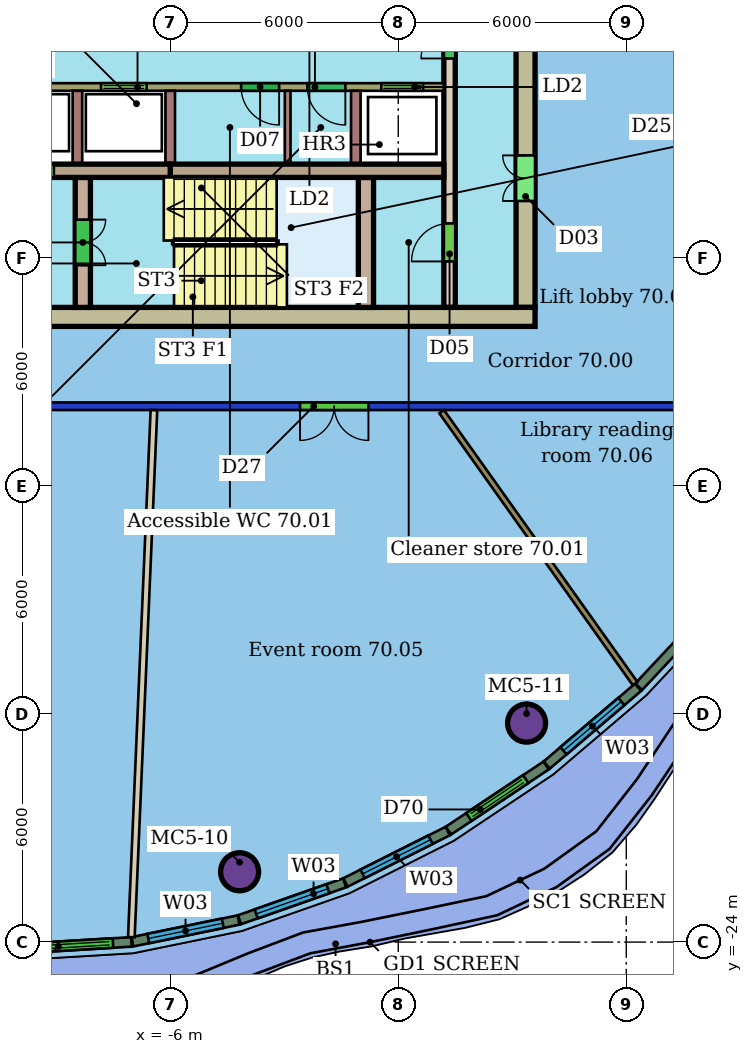
"""IFC4 building model, lengths in metres.
Left out: names, types, materials, properties, quantities, classifications, styles, units other than length and angle.
Written with IfcOpenShell. Run it as: python <this file> out.ifc"""

import sys

from ifc_helpers import new_model, si_unit, direction, frame, frame_2d, origin, origin_2d, place, context, subcontext, project, spatial, rectangle, hollow_circle, extrude, element, fill, save


model = new_model("IFC4")
c1 = context("Model", 3, precision=1e-05, world=origin(), true_north=direction((0.0, 1.0)))
c2 = subcontext(c1, "Body", "Model", "MODEL_VIEW")
j1 = project(units=[si_unit("LENGTHUNIT", "METRE"), si_unit("PLANEANGLEUNIT", "RADIAN")], contexts=[c1])
p1 = place(None, origin())
s1 = spatial("IfcSite", under=j1, at=p1, CompositionType="ELEMENT")
p2 = place(p1, origin())
s2 = spatial("IfcBuilding", under=s1, at=p2, CompositionType="ELEMENT")
p3 = place(p2, frame((0.0, 0.0, 282.9)))
s3 = spatial("IfcBuildingStorey", under=s2, at=p3, CompositionType="ELEMENT", Elevation=282.9)
for number, where, z_axis, x_axis in (
    (1, (-4.175, -22.149, 0.0), (0.0, 0.0, 1.0), (1.0, 0.0, 0.0)),
    (2, (3.377, -18.238, 0.0), (0.0, 0.0, 1.0), (1.0, 0.0, 0.0)),
):
    element("IfcColumn", number, at=place(p3, frame(where, z_axis=z_axis, x_axis=x_axis)), inside=s3, PredefinedType="COLUMN", context=c2, shape_type="SweptSolid", body=[
        extrude(hollow_circle(Radius=0.5, WallThickness=0.04, at=origin_2d()), origin(), (0.0, 0.0, 1.0), 3.45),
    ])
p4 = place(p3, frame((8.4, -9.9, 0.0), z_axis=(0.0, 0.0, 1.0), x_axis=(-1.0, 0.0, 0.0)))
e3 = element("IfcWall", 3, at=p4, inside=s3, PredefinedType="PARTITIONING", context=c2, shape_type="SweptSolid", body=[
    extrude(rectangle(XDim=28.8, YDim=0.2, at=frame_2d((14.4, 0.0))), origin(), (0.0, 0.0, 1.0), 3.1),
])
p5 = place(p4, frame((17.579, 0.0, 0.0)))
e4 = element("IfcOpeningElement", 4, at=p5, cuts=e3, PredefinedType="OPENING", context=c2, shape_type="SweptSolid", body=[
    extrude(rectangle(XDim=1.5, YDim=2.4, at=frame_2d((0.75, 1.2))), frame((0.0, 0.11, 0.0), z_axis=(0.0, -1.0, 0.0), x_axis=(1.0, 0.0, 0.0)), (0.0, 0.0, 1.0), 0.22),
])
p6 = place(p4, frame((9.185, 0.0, 0.0)))
e5 = element("IfcOpeningElement", 5, at=p6, cuts=e3, PredefinedType="OPENING", context=c2, shape_type="SweptSolid", body=[
    extrude(rectangle(XDim=1.8, YDim=2.4, at=frame_2d((0.9, 1.2))), frame((0.0, 0.11, 0.0), z_axis=(0.0, -1.0, 0.0), x_axis=(1.0, 0.0, 0.0)), (0.0, 0.0, 1.0), 0.22),
])
p7 = place(p3, frame((-7.023, -23.871, 0.0), z_axis=(0.0, 0.0, 1.0), x_axis=(0.042831131953, 0.999082326005, 0.0)))
e6 = element("IfcWall", 6, at=p7, inside=s3, PredefinedType="PARTITIONING", context=c2, shape_type="SweptSolid", body=[
    extrude(rectangle(XDim=13.88, YDim=0.175, at=frame_2d((6.94, 0.0))), origin(), (0.0, 0.0, 1.0), 3.45),
])
p8 = place(p3, frame((6.232, -17.198, 0.0), z_axis=(0.0, 0.0, 1.0), x_axis=(-0.579606269786, 0.814896663402, 0.0)))
e7 = element("IfcWall", 7, at=p8, inside=s3, PredefinedType="PARTITIONING", context=c2, shape_type="SweptSolid", body=[
    extrude(rectangle(XDim=8.78, YDim=0.15, at=frame_2d((4.39, 0.0))), origin(), (0.0, 0.0, 1.0), 3.45),
])
p9 = place(p3, frame((-9.792, -24.162, 0.0), z_axis=(0.0, 0.0, 1.0), x_axis=(0.998195899902, 0.060041197678, 0.0)))
e8 = element("IfcWall", 8, at=p9, inside=s3, PredefinedType="SOLIDWALL", context=c2, shape_type="SweptSolid", body=[
    extrude(rectangle(XDim=2.777, YDim=0.25, at=frame_2d((1.389, 0.0))), origin(), (0.0, 0.0, 1.0), 3.15),
])
p10 = place(p9, frame((0.489, 0.0, 0.0)))
e9 = element("IfcOpeningElement", 9, at=p10, cuts=e8, PredefinedType="OPENING", context=c2, shape_type="SweptSolid", body=[
    extrude(rectangle(XDim=1.8, YDim=2.4, at=frame_2d((0.9, 1.2))), frame((0.0, 0.135, 0.0), z_axis=(0.0, -1.0, 0.0), x_axis=(1.0, 0.0, 0.0)), (0.0, 0.0, 1.0), 0.27),
])
p11 = place(p3, frame((-6.994, -23.992, 0.0), z_axis=(0.0, 0.0, 1.0), x_axis=(0.979580220635, 0.201053702627, 0.0)))
e10 = element("IfcWall", 10, at=p11, inside=s3, PredefinedType="SOLIDWALL", context=c2, shape_type="SweptSolid", body=[
    extrude(rectangle(XDim=2.851, YDim=0.25, at=frame_2d((1.426, 0.0))), origin(), (0.0, 0.0, 1.0), 3.15),
])
p12 = place(p11, frame((0.426, 0.0, 0.9)))
e11 = element("IfcOpeningElement", 11, at=p12, cuts=e10, PredefinedType="OPENING", context=c2, shape_type="SweptSolid", body=[
    extrude(rectangle(XDim=2.0, YDim=2.1, at=frame_2d((1.0, 1.05))), frame((0.0, 0.135, 0.0), z_axis=(0.0, -1.0, 0.0), x_axis=(1.0, 0.0, 0.0)), (0.0, 0.0, 1.0), 0.27),
])
p13 = place(p3, frame((-4.177, -23.412, 0.0), z_axis=(0.0, 0.0, 1.0), x_axis=(0.943550214261, 0.331229517355, 0.0)))
e12 = element("IfcWall", 12, at=p13, inside=s3, PredefinedType="SOLIDWALL", context=c2, shape_type="SweptSolid", body=[
    extrude(rectangle(XDim=2.931, YDim=0.25, at=frame_2d((1.466, 0.0))), origin(), (0.0, 0.0, 1.0), 3.15),
])
p14 = place(p13, frame((0.466, 0.0, 0.9)))
e13 = element("IfcOpeningElement", 13, at=p14, cuts=e12, PredefinedType="OPENING", context=c2, shape_type="SweptSolid", body=[
    extrude(rectangle(XDim=2.0, YDim=2.1, at=frame_2d((1.0, 1.05))), frame((0.0, 0.135, 0.0), z_axis=(0.0, -1.0, 0.0), x_axis=(1.0, 0.0, 0.0)), (0.0, 0.0, 1.0), 0.27),
])
p15 = place(p3, frame((-1.39, -22.432, 0.0), z_axis=(0.0, 0.0, 1.0), x_axis=(0.893387281144, 0.449287397875, 0.0)))
e14 = element("IfcWall", 14, at=p15, inside=s3, PredefinedType="SOLIDWALL", context=c2, shape_type="SweptSolid", body=[
    extrude(rectangle(XDim=3.012, YDim=0.25, at=frame_2d((1.506, 0.0))), origin(), (0.0, 0.0, 1.0), 3.15),
])
p16 = place(p15, frame((0.506, 0.0, 0.9)))
e15 = element("IfcOpeningElement", 15, at=p16, cuts=e14, PredefinedType="OPENING", context=c2, shape_type="SweptSolid", body=[
    extrude(rectangle(XDim=2.0, YDim=2.1, at=frame_2d((1.0, 1.05))), frame((0.0, 0.135, 0.0), z_axis=(0.0, -1.0, 0.0), x_axis=(1.0, 0.0, 0.0)), (0.0, 0.0, 1.0), 0.27),
])
p17 = place(p3, frame((1.321, -21.067, 0.0), z_axis=(0.0, 0.0, 1.0), x_axis=(0.831965133189, 0.554827916707, 0.0)))
e16 = element("IfcWall", 16, at=p17, inside=s3, PredefinedType="SOLIDWALL", context=c2, shape_type="SweptSolid", body=[
    extrude(rectangle(XDim=3.088, YDim=0.25, at=frame_2d((1.544, 0.0))), origin(), (0.0, 0.0, 1.0), 3.15),
])
p18 = place(p17, frame((0.644, 0.0, 0.0)))
e17 = element("IfcOpeningElement", 17, at=p18, cuts=e16, PredefinedType="OPENING", context=c2, shape_type="SweptSolid", body=[
    extrude(rectangle(XDim=1.8, YDim=2.4, at=frame_2d((0.9, 1.2))), frame((0.0, 0.135, 0.0), z_axis=(0.0, -1.0, 0.0), x_axis=(1.0, 0.0, 0.0)), (0.0, 0.0, 1.0), 0.27),
])
p19 = place(p3, frame((3.908, -19.34, 0.0), z_axis=(0.0, 0.0, 1.0), x_axis=(0.761601165005, 0.64804603653, 0.0)))
e18 = element("IfcWall", 18, at=p19, inside=s3, PredefinedType="SOLIDWALL", context=c2, shape_type="SweptSolid", body=[
    extrude(rectangle(XDim=3.154, YDim=0.25, at=frame_2d((1.577, 0.0))), origin(), (0.0, 0.0, 1.0), 3.15),
])
p20 = place(p19, frame((0.577, 0.0, 0.9)))
e19 = element("IfcOpeningElement", 19, at=p20, cuts=e18, PredefinedType="OPENING", context=c2, shape_type="SweptSolid", body=[
    extrude(rectangle(XDim=2.0, YDim=2.1, at=frame_2d((1.0, 1.05))), frame((0.0, 0.135, 0.0), z_axis=(0.0, -1.0, 0.0), x_axis=(1.0, 0.0, 0.0)), (0.0, 0.0, 1.0), 0.27),
])
p21 = place(p3, frame((6.326, -17.281, 0.0), z_axis=(0.0, 0.0, 1.0), x_axis=(0.683771659003, 0.729696045176, 0.0)))
e20 = element("IfcWall", 20, at=p21, inside=s3, PredefinedType="SOLIDWALL", context=c2, shape_type="SweptSolid", body=[
    extrude(rectangle(XDim=3.163, YDim=0.25, at=frame_2d((1.582, 0.0))), origin(), (0.0, 0.0, 1.0), 3.15),
])
p22 = place(p3, frame((-15.6, -7.55, 0.0), z_axis=(0.0, 0.0, 1.0), x_axis=(1.0, 0.0, 0.0)))
e21 = element("IfcWall", 21, at=p22, inside=s3, PredefinedType="SHEAR", context=c2, shape_type="SweptSolid", body=[
    extrude(rectangle(XDim=19.2, YDim=0.5, at=frame_2d((9.6, 0.0))), origin(), (0.0, 0.0, 1.0), 3.3),
])
p23 = place(p22, frame((3.6, 0.0, 0.0)))
e22 = element("IfcOpeningElement", 22, at=p23, cuts=e21, PredefinedType="OPENING", context=c2, shape_type="SweptSolid", body=[
    extrude(rectangle(XDim=1.2, YDim=2.1, at=frame_2d((0.6, 1.05))), frame((0.0, 0.26, 0.0), z_axis=(0.0, -1.0, 0.0), x_axis=(1.0, 0.0, 0.0)), (0.0, 0.0, 1.0), 0.52),
])
p24 = place(p3, frame((3.35, -7.3, 0.0), z_axis=(0.0, 0.0, 1.0), x_axis=(0.0, 1.0, 0.0)))
e23 = element("IfcWall", 23, at=p24, inside=s3, PredefinedType="SHEAR", context=c2, shape_type="SweptSolid", body=[
    extrude(rectangle(XDim=14.6, YDim=0.5, at=frame_2d((7.3, 0.0))), origin(), (0.0, 0.0, 1.0), 3.3),
])
p25 = place(p24, frame((2.8, 0.0, 0.0)))
e24 = element("IfcOpeningElement", 24, at=p25, cuts=e23, PredefinedType="OPENING", context=c2, shape_type="SweptSolid", body=[
    extrude(rectangle(XDim=1.2, YDim=2.1, at=frame_2d((0.6, 1.05))), frame((0.0, 0.26, 0.0), z_axis=(0.0, -1.0, 0.0), x_axis=(1.0, 0.0, 0.0)), (0.0, 0.0, 1.0), 0.52),
])
p26 = place(p24, frame((10.6, 0.0, 0.0)))
e25 = element("IfcOpeningElement", 25, at=p26, cuts=e23, PredefinedType="OPENING", context=c2, shape_type="SweptSolid", body=[
    extrude(rectangle(XDim=1.2, YDim=2.1, at=frame_2d((0.6, 1.05))), frame((0.0, 0.26, 0.0), z_axis=(0.0, -1.0, 0.0), x_axis=(1.0, 0.0, 0.0)), (0.0, 0.0, 1.0), 0.52),
])
p27 = place(p3, frame((-13.2, -3.705, 0.0), z_axis=(0.0, 0.0, 1.0), x_axis=(1.0, 0.0, 0.0)))
e26 = element("IfcWall", 26, at=p27, inside=s3, PredefinedType="SHEAR", context=c2, shape_type="SweptSolid", body=[
    extrude(rectangle(XDim=7.2, YDim=0.35, at=frame_2d((3.6, 0.0))), origin(), (0.0, 0.0, 1.0), 3.3),
])
p28 = place(p27, frame((0.496, 0.0, 0.0)))
e27 = element("IfcOpeningElement", 27, at=p28, cuts=e26, PredefinedType="OPENING", context=c2, shape_type="SweptSolid", body=[
    extrude(rectangle(XDim=1.2, YDim=2.1, at=frame_2d((0.6, 1.05))), frame((0.0, 0.185, 0.0), z_axis=(0.0, -1.0, 0.0), x_axis=(1.0, 0.0, 0.0)), (0.0, 0.0, 1.0), 0.37),
])
p29 = place(p27, frame((2.938, 0.0, 0.0)))
e28 = element("IfcOpeningElement", 28, at=p29, cuts=e26, PredefinedType="OPENING", context=c2, shape_type="SweptSolid", body=[
    extrude(rectangle(XDim=1.2, YDim=2.1, at=frame_2d((0.6, 1.05))), frame((0.0, 0.185, 0.0), z_axis=(0.0, -1.0, 0.0), x_axis=(1.0, 0.0, 0.0)), (0.0, 0.0, 1.0), 0.37),
])
p30 = place(p3, frame((-6.0, -3.705, 0.0), z_axis=(0.0, 0.0, 1.0), x_axis=(1.0, 0.0, 0.0)))
e29 = element("IfcWall", 29, at=p30, inside=s3, PredefinedType="SHEAR", context=c2, shape_type="SweptSolid", body=[
    extrude(rectangle(XDim=7.2, YDim=0.35, at=frame_2d((3.6, 0.0))), origin(), (0.0, 0.0, 1.0), 3.3),
])
p31 = place(p3, frame((1.35, -7.3, 0.0), z_axis=(0.0, 0.0, 1.0), x_axis=(0.0, 1.0, 0.0)))
e30 = element("IfcWall", 30, at=p31, inside=s3, PredefinedType="SHEAR", context=c2, shape_type="SweptSolid", body=[
    extrude(rectangle(XDim=14.6, YDim=0.3, at=frame_2d((7.3, 0.0))), origin(), (0.0, 0.0, 1.0), 3.3),
])
p32 = place(p31, frame((1.21, 0.0, 0.0)))
e31 = element("IfcOpeningElement", 31, at=p32, cuts=e30, PredefinedType="OPENING", context=c2, shape_type="SweptSolid", body=[
    extrude(rectangle(XDim=1.0, YDim=2.1, at=frame_2d((0.5, 1.05))), frame((0.0, 0.16, 0.0), z_axis=(0.0, -1.0, 0.0), x_axis=(1.0, 0.0, 0.0)), (0.0, 0.0, 1.0), 0.32),
])
p33 = place(p31, frame((6.55, 0.0, 0.0)))
e32 = element("IfcOpeningElement", 32, at=p33, cuts=e30, PredefinedType="OPENING", context=c2, shape_type="SweptSolid", body=[
    extrude(rectangle(XDim=1.5, YDim=2.1, at=frame_2d((0.75, 1.05))), frame((0.0, 0.16, 0.0), z_axis=(0.0, -1.0, 0.0), x_axis=(1.0, 0.0, 0.0)), (0.0, 0.0, 1.0), 0.32),
])
p34 = place(p3, frame((1.2, -1.5, 0.0), z_axis=(0.0, 0.0, 1.0), x_axis=(-1.0, 0.0, 0.0)))
e33 = element("IfcWall", 33, at=p34, inside=s3, PredefinedType="SHEAR", context=c2, shape_type="SweptSolid", body=[
    extrude(rectangle(XDim=14.4, YDim=0.2, at=frame_2d((7.2, 0.0))), origin(), (0.0, 0.0, 1.0), 3.3),
])
p35 = place(p34, frame((7.821, 0.0, 0.0)))
e34 = element("IfcOpeningElement", 34, at=p35, cuts=e33, PredefinedType="OPENING", context=c2, shape_type="SweptSolid", body=[
    extrude(rectangle(XDim=1.2, YDim=2.1, at=frame_2d((0.6, 1.05))), frame((0.0, 0.11, 0.0), z_axis=(0.0, -1.0, 0.0), x_axis=(1.0, 0.0, 0.0)), (0.0, 0.0, 1.0), 0.22),
])
p36 = place(p34, frame((0.546, 0.0, 0.0)))
e35 = element("IfcOpeningElement", 35, at=p36, cuts=e33, PredefinedType="OPENING", context=c2, shape_type="SweptSolid", body=[
    extrude(rectangle(XDim=1.1, YDim=2.1, at=frame_2d((0.55, 1.05))), frame((0.0, 0.11, 0.0), z_axis=(0.0, -1.0, 0.0), x_axis=(1.0, 0.0, 0.0)), (0.0, 0.0, 1.0), 0.22),
])
p37 = place(p34, frame((4.335, 0.0, 0.0)))
e36 = element("IfcOpeningElement", 36, at=p37, cuts=e33, PredefinedType="OPENING", context=c2, shape_type="SweptSolid", body=[
    extrude(rectangle(XDim=1.0, YDim=2.1, at=frame_2d((0.5, 1.05))), frame((0.0, 0.11, 0.0), z_axis=(0.0, -1.0, 0.0), x_axis=(1.0, 0.0, 0.0)), (0.0, 0.0, 1.0), 0.22),
])
p38 = place(p34, frame((2.592, 0.0, 0.0)))
e37 = element("IfcOpeningElement", 37, at=p38, cuts=e33, PredefinedType="OPENING", context=c2, shape_type="SweptSolid", body=[
    extrude(rectangle(XDim=1.0, YDim=2.1, at=frame_2d((0.5, 1.05))), frame((0.0, 0.11, 0.0), z_axis=(0.0, -1.0, 0.0), x_axis=(1.0, 0.0, 0.0)), (0.0, 0.0, 1.0), 0.22),
])
p39 = place(p3, frame((-8.3, -3.88, 0.0), z_axis=(0.0, 0.0, 1.0), x_axis=(0.0, -1.0, 0.0)))
e38 = element("IfcWall", 38, at=p39, inside=s3, PredefinedType="SHEAR", context=c2, shape_type="SweptSolid", body=[
    extrude(rectangle(XDim=3.42, YDim=0.4, at=frame_2d((1.71, 0.0))), origin(), (0.0, 0.0, 1.0), 3.3),
])
p40 = place(p39, frame((1.11, 0.0, 0.0)))
e39 = element("IfcOpeningElement", 39, at=p40, cuts=e38, PredefinedType="OPENING", context=c2, shape_type="SweptSolid", body=[
    extrude(rectangle(XDim=1.2, YDim=2.1, at=frame_2d((0.6, 1.05))), frame((0.0, 0.21, 0.0), z_axis=(0.0, -1.0, 0.0), x_axis=(1.0, 0.0, 0.0)), (0.0, 0.0, 1.0), 0.42),
])
p41 = place(p3, frame((-0.85, -3.88, 0.0), z_axis=(0.0, 0.0, 1.0), x_axis=(0.0, -1.0, 0.0)))
e40 = element("IfcWall", 40, at=p41, inside=s3, PredefinedType="SHEAR", context=c2, shape_type="SweptSolid", body=[
    extrude(rectangle(XDim=3.42, YDim=0.4, at=frame_2d((1.71, 0.0))), origin(), (0.0, 0.0, 1.0), 3.3),
])
for number, where, z_axis, x_axis in (
    (41, (-8.442, -1.6, 0.0), (0.0, 0.0, 1.0), (0.0, -1.0, 0.0)),
    (42, (-6.0, -1.6, 0.0), (0.0, 0.0, 1.0), (0.0, -1.0, 0.0)),
    (43, (-1.117, -1.6, 0.0), (0.0, 0.0, 1.0), (0.0, -1.0, 0.0)),
):
    element("IfcWall", number, at=place(p3, frame(where, z_axis=z_axis, x_axis=x_axis)), inside=s3, PredefinedType="SHEAR", context=c2, shape_type="SweptSolid", body=[
        extrude(rectangle(XDim=1.93, YDim=0.25, at=frame_2d((0.965, 0.0))), origin(), (0.0, 0.0, 1.0), 3.3),
    ])
p42 = place(p3, frame((-2.91, -1.6, 0.0), z_axis=(0.0, 0.0, 1.0), x_axis=(0.0, -1.0, 0.0)))
e44 = element("IfcWall", 44, at=p42, inside=s3, PredefinedType="PARTITIONING", context=c2, shape_type="SweptSolid", body=[
    extrude(rectangle(XDim=1.93, YDim=0.15, at=frame_2d((0.965, 0.0))), origin(), (0.0, 0.0, 1.0), 3.3),
])
p43 = place(p6, origin())
e45 = element("IfcDoor", 45, at=p43, inside=s3, OperationType="DOUBLE_DOOR_SINGLE_SWING", PredefinedType="DOOR", context=c2, shape_type="SweptSolid", body=[
    extrude(rectangle(XDim=1.8, YDim=2.4, at=frame_2d((0.9, 1.2))), frame((0.0, 0.025, 0.0), z_axis=(0.0, -1.0, 0.0), x_axis=(1.0, 0.0, 0.0)), (0.0, 0.0, 1.0), 0.05),
])
fill(e5, e45)
p44 = place(p10, origin())
e46 = element("IfcDoor", 46, at=p44, inside=s3, OperationType="DOUBLE_DOOR_SLIDING", PredefinedType="DOOR", context=c2, shape_type="SweptSolid", body=[
    extrude(rectangle(XDim=1.8, YDim=2.4, at=frame_2d((0.9, 1.2))), frame((0.0, 0.025, 0.0), z_axis=(0.0, -1.0, 0.0), x_axis=(1.0, 0.0, 0.0)), (0.0, 0.0, 1.0), 0.05),
])
fill(e9, e46)
p45 = place(p12, origin())
e47 = element("IfcWindow", 47, at=p45, inside=s3, PartitioningType="SINGLE_PANEL", PredefinedType="WINDOW", context=c2, shape_type="SweptSolid", body=[
    extrude(rectangle(XDim=2.0, YDim=2.1, at=frame_2d((1.0, 1.05))), frame((0.0, 0.03, 0.0), z_axis=(0.0, -1.0, 0.0), x_axis=(1.0, 0.0, 0.0)), (0.0, 0.0, 1.0), 0.06),
])
fill(e11, e47)
p46 = place(p14, origin())
e48 = element("IfcWindow", 48, at=p46, inside=s3, PartitioningType="SINGLE_PANEL", PredefinedType="WINDOW", context=c2, shape_type="SweptSolid", body=[
    extrude(rectangle(XDim=2.0, YDim=2.1, at=frame_2d((1.0, 1.05))), frame((0.0, 0.03, 0.0), z_axis=(0.0, -1.0, 0.0), x_axis=(1.0, 0.0, 0.0)), (0.0, 0.0, 1.0), 0.06),
])
fill(e13, e48)
p47 = place(p16, origin())
e49 = element("IfcWindow", 49, at=p47, inside=s3, PartitioningType="SINGLE_PANEL", PredefinedType="WINDOW", context=c2, shape_type="SweptSolid", body=[
    extrude(rectangle(XDim=2.0, YDim=2.1, at=frame_2d((1.0, 1.05))), frame((0.0, 0.03, 0.0), z_axis=(0.0, -1.0, 0.0), x_axis=(1.0, 0.0, 0.0)), (0.0, 0.0, 1.0), 0.06),
])
fill(e15, e49)
p48 = place(p18, origin())
e50 = element("IfcDoor", 50, at=p48, inside=s3, OperationType="DOUBLE_DOOR_SLIDING", PredefinedType="DOOR", context=c2, shape_type="SweptSolid", body=[
    extrude(rectangle(XDim=1.8, YDim=2.4, at=frame_2d((0.9, 1.2))), frame((0.0, 0.025, 0.0), z_axis=(0.0, -1.0, 0.0), x_axis=(1.0, 0.0, 0.0)), (0.0, 0.0, 1.0), 0.05),
])
fill(e17, e50)
p49 = place(p20, origin())
e51 = element("IfcWindow", 51, at=p49, inside=s3, PartitioningType="SINGLE_PANEL", PredefinedType="WINDOW", context=c2, shape_type="SweptSolid", body=[
    extrude(rectangle(XDim=2.0, YDim=2.1, at=frame_2d((1.0, 1.05))), frame((0.0, 0.03, 0.0), z_axis=(0.0, -1.0, 0.0), x_axis=(1.0, 0.0, 0.0)), (0.0, 0.0, 1.0), 0.06),
])
fill(e19, e51)
p50 = place(p25, origin())
e52 = element("IfcDoor", 52, at=p50, inside=s3, OperationType="DOUBLE_DOOR_SINGLE_SWING", PredefinedType="NOTDEFINED", context=c2, shape_type="SweptSolid", body=[
    extrude(rectangle(XDim=1.2, YDim=2.1, at=frame_2d((0.6, 1.05))), frame((0.0, 0.025, 0.0), z_axis=(0.0, -1.0, 0.0), x_axis=(1.0, 0.0, 0.0)), (0.0, 0.0, 1.0), 0.05),
])
fill(e24, e52)
p51 = place(p29, origin())
e53 = element("IfcDoor", 53, at=p51, inside=s3, OperationType="DOUBLE_DOOR_SLIDING", PredefinedType="NOTDEFINED", context=c2, shape_type="SweptSolid", body=[
    extrude(rectangle(XDim=1.2, YDim=2.1, at=frame_2d((0.6, 1.05))), frame((0.0, 0.025, 0.0), z_axis=(0.0, -1.0, 0.0), x_axis=(1.0, 0.0, 0.0)), (0.0, 0.0, 1.0), 0.05),
])
fill(e28, e53)
p52 = place(p32, origin())
e54 = element("IfcDoor", 54, at=p52, inside=s3, OperationType="SINGLE_SWING_LEFT", PredefinedType="NOTDEFINED", context=c2, shape_type="SweptSolid", body=[
    extrude(rectangle(XDim=1.0, YDim=2.1, at=frame_2d((0.5, 1.05))), frame((0.0, 0.025, 0.0), z_axis=(0.0, -1.0, 0.0), x_axis=(1.0, 0.0, 0.0)), (0.0, 0.0, 1.0), 0.05),
])
fill(e31, e54)
p53 = place(p33, origin())
e55 = element("IfcDoor", 55, at=p53, inside=s3, OperationType="DOUBLE_DOOR_SINGLE_SWING", PredefinedType="NOTDEFINED", context=c2, shape_type="SweptSolid", body=[
    extrude(rectangle(XDim=1.5, YDim=2.1, at=frame_2d((0.75, 1.05))), frame((0.0, 0.025, 0.0), z_axis=(0.0, -1.0, 0.0), x_axis=(1.0, 0.0, 0.0)), (0.0, 0.0, 1.0), 0.05),
])
fill(e32, e55)
p54 = place(p35, origin())
e56 = element("IfcDoor", 56, at=p54, inside=s3, OperationType="DOUBLE_DOOR_SLIDING", PredefinedType="NOTDEFINED", context=c2, shape_type="SweptSolid", body=[
    extrude(rectangle(XDim=1.2, YDim=2.1, at=frame_2d((0.6, 1.05))), frame((0.0, 0.025, 0.0), z_axis=(0.0, -1.0, 0.0), x_axis=(1.0, 0.0, 0.0)), (0.0, 0.0, 1.0), 0.05),
])
fill(e34, e56)
p55 = place(p36, origin())
e57 = element("IfcDoor", 57, at=p55, inside=s3, OperationType="DOUBLE_DOOR_SLIDING", PredefinedType="NOTDEFINED", context=c2, shape_type="SweptSolid", body=[
    extrude(rectangle(XDim=1.1, YDim=2.1, at=frame_2d((0.55, 1.05))), frame((0.0, 0.025, 0.0), z_axis=(0.0, -1.0, 0.0), x_axis=(1.0, 0.0, 0.0)), (0.0, 0.0, 1.0), 0.05),
])
fill(e35, e57)
p56 = place(p37, origin())
e58 = element("IfcDoor", 58, at=p56, inside=s3, OperationType="SINGLE_SWING_LEFT", PredefinedType="NOTDEFINED", context=c2, shape_type="SweptSolid", body=[
    extrude(rectangle(XDim=1.0, YDim=2.1, at=frame_2d((0.5, 1.05))), frame((0.0, 0.025, 0.0), z_axis=(0.0, -1.0, 0.0), x_axis=(1.0, 0.0, 0.0)), (0.0, 0.0, 1.0), 0.05),
])
fill(e36, e58)
p57 = place(p38, origin())
e59 = element("IfcDoor", 59, at=p57, inside=s3, OperationType="SINGLE_SWING_LEFT", PredefinedType="NOTDEFINED", context=c2, shape_type="SweptSolid", body=[
    extrude(rectangle(XDim=1.0, YDim=2.1, at=frame_2d((0.5, 1.05))), frame((0.0, 0.025, 0.0), z_axis=(0.0, -1.0, 0.0), x_axis=(1.0, 0.0, 0.0)), (0.0, 0.0, 1.0), 0.05),
])
fill(e37, e59)
p58 = place(p40, origin())
e60 = element("IfcDoor", 60, at=p58, inside=s3, OperationType="DOUBLE_DOOR_SINGLE_SWING", PredefinedType="NOTDEFINED", context=c2, shape_type="SweptSolid", body=[
    extrude(rectangle(XDim=1.2, YDim=2.1, at=frame_2d((0.6, 1.05))), frame((0.0, 0.025, 0.0), z_axis=(0.0, -1.0, 0.0), x_axis=(1.0, 0.0, 0.0)), (0.0, 0.0, 1.0), 0.05),
])
fill(e39, e60)
save(model, sys.argv[1])
